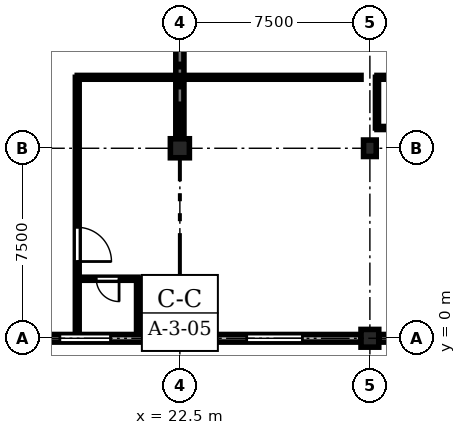
"""IFC4 building model, lengths in metres.
Left out: names, types, materials, properties, quantities, classifications, styles, units other than length and angle.
Written with IfcOpenShell. Run it as: python <this file> out.ifc"""

import sys

from ifc_helpers import new_model, si_unit, direction, frame, frame_2d, origin, origin_2d, place, context, subcontext, project, spatial, rectangle, extrude, element, fill, save


model = new_model("IFC4")
c1 = context("Model", 3, precision=1e-05, world=origin(), true_north=direction((0.0, 1.0)))
c2 = subcontext(c1, "Body", "Model", "MODEL_VIEW")
j1 = project(units=[si_unit("LENGTHUNIT", "METRE"), si_unit("PLANEANGLEUNIT", "RADIAN")], contexts=[c1])
p1 = place(None, origin())
s1 = spatial("IfcSite", under=j1, at=p1, CompositionType="ELEMENT")
p2 = place(p1, origin())
s2 = spatial("IfcBuilding", under=s1, at=p2, CompositionType="ELEMENT")
p3 = place(p2, frame((0.0, 0.0, 14.1)))
s3 = spatial("IfcBuildingStorey", under=s2, at=p3, CompositionType="ELEMENT", Elevation=14.1)
p4 = place(p3, frame((22.5, 0.0, 0.0), z_axis=(0.0, 0.0, 1.0), x_axis=(1.0, 0.0, 0.0)))
e1 = element("IfcColumn", 1, at=p4, inside=s3, PredefinedType="COLUMN", context=c2, shape_type="SweptSolid", body=[
    extrude(rectangle(XDim=0.65, YDim=0.65, at=origin_2d()), origin(), (0.0, 0.0, 1.0), 3.75),
])
p5 = place(p3, frame((22.5, 7.5, 0.0), z_axis=(0.0, 0.0, 1.0), x_axis=(1.0, 0.0, 0.0)))
e2 = element("IfcColumn", 2, at=p5, inside=s3, PredefinedType="COLUMN", context=c2, shape_type="SweptSolid", body=[
    extrude(rectangle(XDim=0.75, YDim=0.75, at=origin_2d()), origin(), (0.0, 0.0, 1.0), 3.75),
])
p6 = place(p3, frame((30.0, 0.0, 0.0), z_axis=(0.0, 0.0, 1.0), x_axis=(1.0, 0.0, 0.0)))
e3 = element("IfcColumn", 3, at=p6, inside=s3, PredefinedType="COLUMN", context=c2, shape_type="SweptSolid", body=[
    extrude(rectangle(XDim=0.7, YDim=0.7, at=origin_2d()), origin(), (0.0, 0.0, 1.0), 3.75),
])
p7 = place(p3, frame((30.0, 7.5, 0.0), z_axis=(0.0, 0.0, 1.0), x_axis=(1.0, 0.0, 0.0)))
e4 = element("IfcColumn", 4, at=p7, inside=s3, PredefinedType="COLUMN", context=c2, shape_type="SweptSolid", body=[
    extrude(rectangle(XDim=0.5, YDim=0.65, at=origin_2d()), origin(), (0.0, 0.0, 1.0), 3.75),
])
p8 = place(p3, frame((22.5, 7.95, 0.0), z_axis=(0.0, 0.0, 1.0), x_axis=(0.0, 1.0, 0.0)))
e5 = element("IfcWall", 5, at=p8, inside=s3, PredefinedType="SHEAR", context=c2, shape_type="SweptSolid", body=[
    extrude(rectangle(XDim=6.6, YDim=0.32, at=frame_2d((3.3, 0.0))), origin(), (0.0, 0.0, 1.0), 2.92),
])
p9 = place(p3, frame((22.165, 0.0, 0.0), z_axis=(0.0, 0.0, 1.0), x_axis=(-1.0, 0.0, 0.0)))
e6 = element("IfcWall", 6, at=p9, inside=s3, PredefinedType="STANDARD", context=c2, shape_type="SweptSolid", body=[
    extrude(rectangle(XDim=6.805, YDim=0.3, at=frame_2d((3.402, 0.0))), origin(), (0.0, 0.0, 1.0), 2.87),
])
p10 = place(p9, frame((2.403, 0.0, 0.9)))
e7 = element("IfcOpeningElement", 7, at=p10, cuts=e6, PredefinedType="OPENING", context=c2, shape_type="SweptSolid", body=[
    extrude(rectangle(XDim=2.0, YDim=1.69, at=frame_2d((1.0, 0.845))), frame((0.0, 0.16, 0.0), z_axis=(0.0, -1.0, 0.0), x_axis=(1.0, 0.0, 0.0)), (0.0, 0.0, 1.0), 0.32),
])
p11 = place(p3, frame((29.64, 0.0, 0.0), z_axis=(0.0, 0.0, 1.0), x_axis=(-1.0, 0.0, 0.0)))
e8 = element("IfcWall", 8, at=p11, inside=s3, PredefinedType="STANDARD", context=c2, shape_type="SweptSolid", body=[
    extrude(rectangle(XDim=6.805, YDim=0.3, at=frame_2d((3.402, 0.0))), origin(), (0.0, 0.0, 1.0), 2.87),
])
p12 = place(p11, frame((2.302, 0.0, 0.9)))
e9 = element("IfcOpeningElement", 9, at=p12, cuts=e8, PredefinedType="OPENING", context=c2, shape_type="SweptSolid", body=[
    extrude(rectangle(XDim=2.2, YDim=1.69, at=frame_2d((1.1, 0.845))), frame((0.0, 0.16, 0.0), z_axis=(0.0, -1.0, 0.0), x_axis=(1.0, 0.0, 0.0)), (0.0, 0.0, 1.0), 0.32),
])
p13 = place(p3, frame((37.165, 0.0, 0.0), z_axis=(0.0, 0.0, 1.0), x_axis=(-1.0, 0.0, 0.0)))
e10 = element("IfcWall", 10, at=p13, inside=s3, PredefinedType="STANDARD", context=c2, shape_type="SweptSolid", body=[
    extrude(rectangle(XDim=6.805, YDim=0.3, at=frame_2d((3.402, 0.0))), origin(), (0.0, 0.0, 1.0), 2.87),
])
p14 = place(p13, frame((2.702, 0.0, 0.9)))
e11 = element("IfcOpeningElement", 11, at=p14, cuts=e10, PredefinedType="OPENING", context=c2, shape_type="SweptSolid", body=[
    extrude(rectangle(XDim=1.4, YDim=1.69, at=frame_2d((0.7, 0.845))), frame((0.0, 0.16, 0.0), z_axis=(0.0, -1.0, 0.0), x_axis=(1.0, 0.0, 0.0)), (0.0, 0.0, 1.0), 0.32),
])
p15 = place(p3, frame((18.45, 10.3, 0.0), z_axis=(0.0, 0.0, 1.0), x_axis=(0.0, -1.0, 0.0)))
e12 = element("IfcWall", 12, at=p15, inside=s3, PredefinedType="PARTITIONING", context=c2, shape_type="SweptSolid", body=[
    extrude(rectangle(XDim=9.95, YDim=0.15, at=frame_2d((4.975, 0.0))), origin(), (0.0, 0.0, 1.0), 3.455),
])
p16 = place(p15, frame((5.92, 0.0, 0.0)))
e13 = element("IfcOpeningElement", 13, at=p16, cuts=e12, PredefinedType="OPENING", context=c2, shape_type="SweptSolid", body=[
    extrude(rectangle(XDim=1.35, YDim=2.25, at=frame_2d((0.675, 1.125))), frame((0.0, 0.085, 0.0), z_axis=(0.0, -1.0, 0.0), x_axis=(1.0, 0.0, 0.0)), (0.0, 0.0, 1.0), 0.17),
])
p17 = place(p3, frame((20.85, 2.35, 0.0), z_axis=(0.0, 0.0, 1.0), x_axis=(-1.0, 0.0, 0.0)))
e14 = element("IfcWall", 14, at=p17, inside=s3, PredefinedType="PARTITIONING", context=c2, shape_type="SweptSolid", body=[
    extrude(rectangle(XDim=2.4, YDim=0.12, at=frame_2d((1.2, 0.0))), origin(), (0.0, 0.0, 1.0), 3.455),
])
p18 = place(p17, frame((0.75, 0.0, 0.0)))
e15 = element("IfcOpeningElement", 15, at=p18, cuts=e14, PredefinedType="OPENING", context=c2, shape_type="SweptSolid", body=[
    extrude(rectangle(XDim=0.9, YDim=2.1, at=frame_2d((0.45, 1.05))), frame((0.0, 0.07, 0.0), z_axis=(0.0, -1.0, 0.0), x_axis=(1.0, 0.0, 0.0)), (0.0, 0.0, 1.0), 0.14),
])
p19 = place(p3, frame((20.85, 0.35, 0.0), z_axis=(0.0, 0.0, 1.0), x_axis=(0.0, 1.0, 0.0)))
e16 = element("IfcWall", 16, at=p19, inside=s3, PredefinedType="PARTITIONING", context=c2, shape_type="SweptSolid", body=[
    extrude(rectangle(XDim=2.0, YDim=0.12, at=frame_2d((1.0, 0.0))), origin(), (0.0, 0.0, 1.0), 3.455),
])
p20 = place(p3, frame((39.937, 10.3, 0.0), z_axis=(0.0, 0.0, 1.0), x_axis=(-1.0, 0.0, 0.0)))
e17 = element("IfcWall", 17, at=p20, inside=s3, PredefinedType="PARTITIONING", context=c2, shape_type="SweptSolid", body=[
    extrude(rectangle(XDim=9.657, YDim=0.15, at=frame_2d((4.828, 0.0))), origin(), (0.0, 0.0, 1.0), 3.455),
])
p21 = place(p20, frame((4.934, 0.0, 0.0)))
e18 = element("IfcOpeningElement", 18, at=p21, cuts=e17, PredefinedType="OPENING", context=c2, shape_type="SweptSolid", body=[
    extrude(rectangle(XDim=1.35, YDim=2.25, at=frame_2d((0.675, 1.125))), frame((0.0, 0.085, 0.0), z_axis=(0.0, -1.0, 0.0), x_axis=(1.0, 0.0, 0.0)), (0.0, 0.0, 1.0), 0.17),
])
p22 = place(p3, frame((30.28, 8.3, 0.0), z_axis=(0.0, 0.0, 1.0), x_axis=(1.0, 0.0, 0.0)))
e19 = element("IfcWall", 19, at=p22, inside=s3, PredefinedType="PARTITIONING", context=c2, shape_type="SweptSolid", body=[
    extrude(rectangle(XDim=2.4, YDim=0.12, at=frame_2d((1.2, 0.0))), origin(), (0.0, 0.0, 1.0), 3.455),
])
p23 = place(p22, frame((0.75, 0.0, 0.0)))
e20 = element("IfcOpeningElement", 20, at=p23, cuts=e19, PredefinedType="OPENING", context=c2, shape_type="SweptSolid", body=[
    extrude(rectangle(XDim=0.9, YDim=2.1, at=frame_2d((0.45, 1.05))), frame((0.0, 0.07, 0.0), z_axis=(0.0, -1.0, 0.0), x_axis=(1.0, 0.0, 0.0)), (0.0, 0.0, 1.0), 0.14),
])
p24 = place(p3, frame((18.45, 10.3, 0.0), z_axis=(0.0, 0.0, 1.0), x_axis=(1.0, 0.0, 0.0)))
e21 = element("IfcWall", 21, at=p24, inside=s3, PredefinedType="PARTITIONING", context=c2, shape_type="SweptSolid", body=[
    extrude(rectangle(XDim=11.2, YDim=0.15, at=frame_2d((5.6, 0.0))), origin(), (0.0, 0.0, 1.0), 3.455),
])
p25 = place(p3, frame((30.28, 8.3, 0.0), z_axis=(0.0, 0.0, 1.0), x_axis=(0.0, 1.0, 0.0)))
e22 = element("IfcWall", 22, at=p25, inside=s3, PredefinedType="PARTITIONING", context=c2, shape_type="SweptSolid", body=[
    extrude(rectangle(XDim=2.0, YDim=0.12, at=frame_2d((1.0, 0.0))), origin(), (0.0, 0.0, 1.0), 2.955),
])
p26 = place(p10, origin())
e23 = element("IfcWindow", 23, at=p26, inside=s3, PartitioningType="SINGLE_PANEL", PredefinedType="WINDOW", context=c2, shape_type="SweptSolid", body=[
    extrude(rectangle(XDim=2.0, YDim=1.69, at=frame_2d((1.0, 0.845))), frame((0.0, 0.03, 0.0), z_axis=(0.0, -1.0, 0.0), x_axis=(1.0, 0.0, 0.0)), (0.0, 0.0, 1.0), 0.06),
])
fill(e7, e23)
p27 = place(p12, origin())
e24 = element("IfcWindow", 24, at=p27, inside=s3, PartitioningType="SINGLE_PANEL", PredefinedType="WINDOW", context=c2, shape_type="SweptSolid", body=[
    extrude(rectangle(XDim=2.2, YDim=1.69, at=frame_2d((1.1, 0.845))), frame((0.0, 0.03, 0.0), z_axis=(0.0, -1.0, 0.0), x_axis=(1.0, 0.0, 0.0)), (0.0, 0.0, 1.0), 0.06),
])
fill(e9, e24)
p28 = place(p16, origin())
e25 = element("IfcDoor", 25, at=p28, inside=s3, OperationType="SINGLE_SWING_RIGHT", PredefinedType="DOOR", context=c2, shape_type="SweptSolid", body=[
    extrude(rectangle(XDim=1.35, YDim=2.25, at=frame_2d((0.675, 1.125))), frame((0.0, 0.025, 0.0), z_axis=(0.0, -1.0, 0.0), x_axis=(1.0, 0.0, 0.0)), (0.0, 0.0, 1.0), 0.05),
])
fill(e13, e25)
p29 = place(p18, origin())
e26 = element("IfcDoor", 26, at=p29, inside=s3, OperationType="SINGLE_SWING_LEFT", PredefinedType="DOOR", context=c2, shape_type="SweptSolid", body=[
    extrude(rectangle(XDim=0.9, YDim=2.1, at=frame_2d((0.45, 1.05))), frame((0.0, 0.025, 0.0), z_axis=(0.0, -1.0, 0.0), x_axis=(1.0, 0.0, 0.0)), (0.0, 0.0, 1.0), 0.05),
])
fill(e15, e26)
save(model, sys.argv[1])
